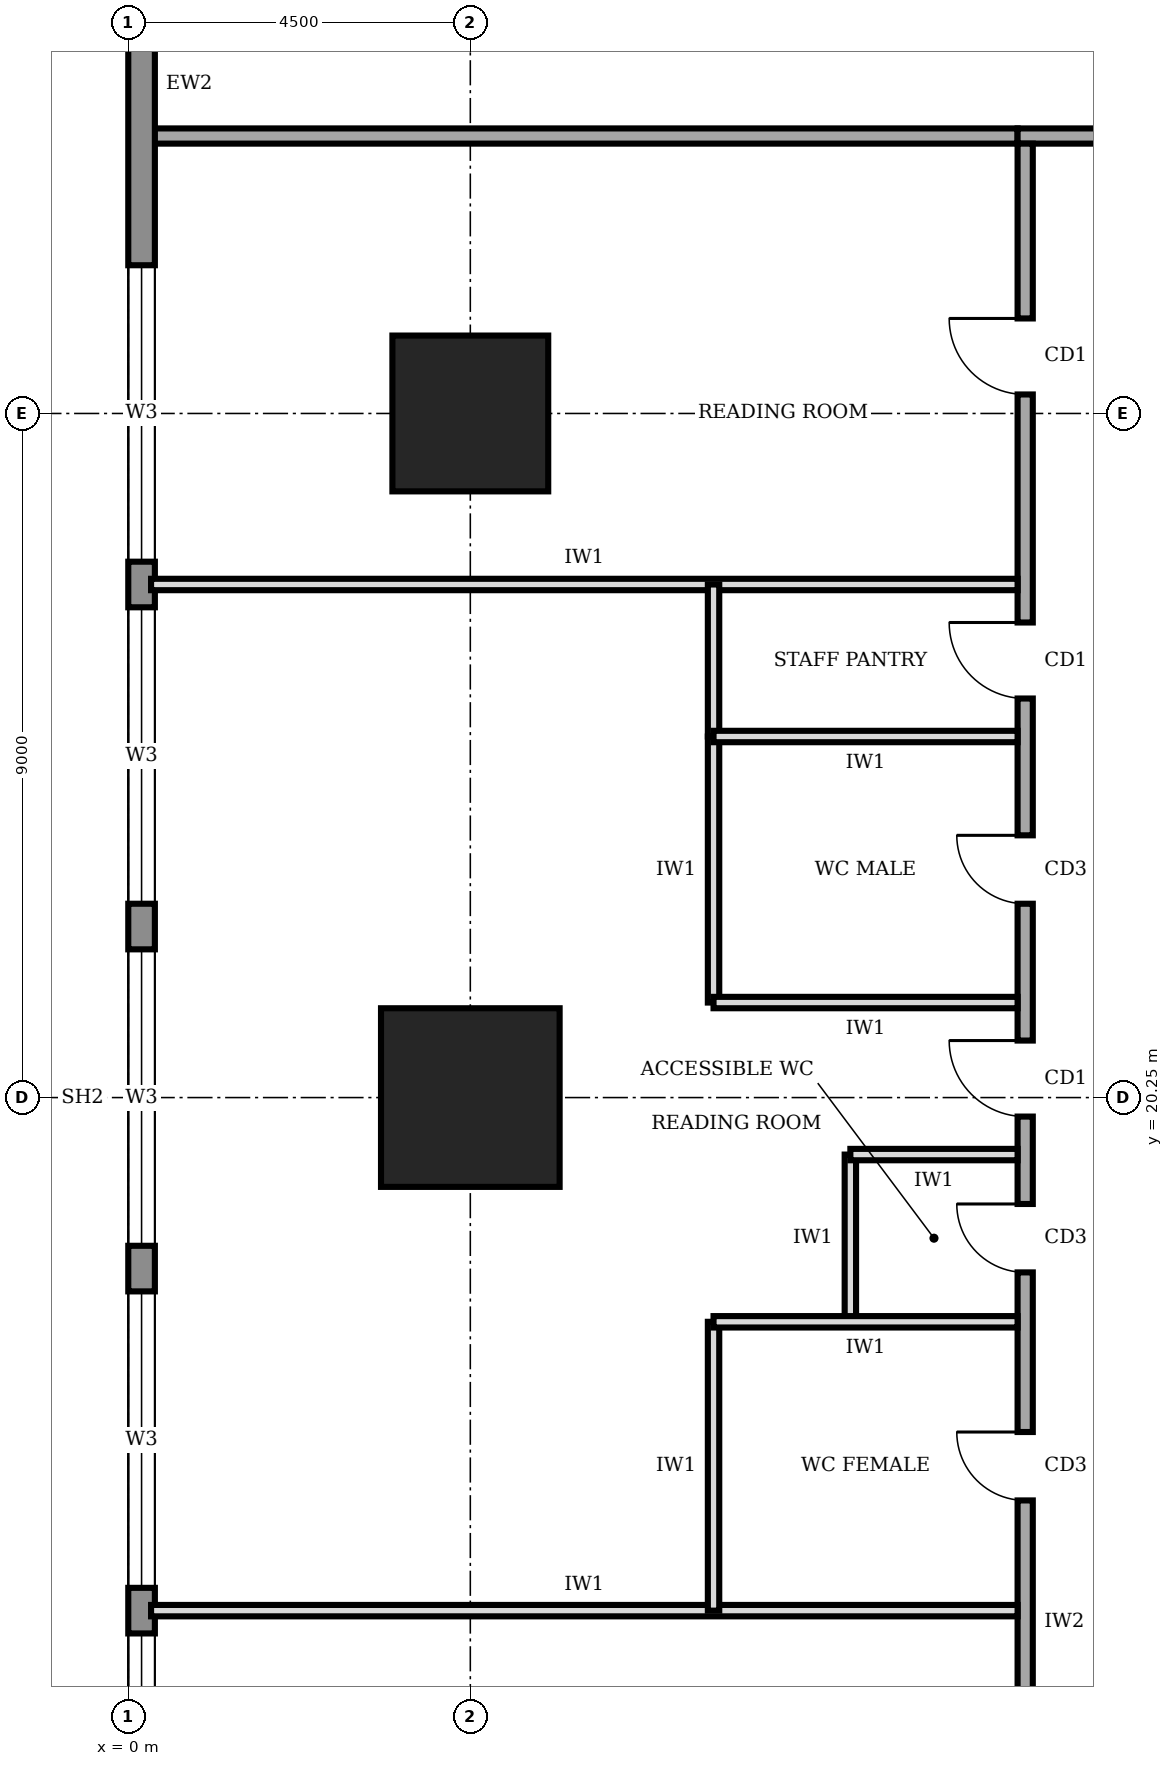
"""IFC4 building model, lengths in metres.
Left out: names, types, materials, properties, quantities, classifications, styles, units other than length and angle.
Written with IfcOpenShell. Run it as: python <this file> out.ifc"""

import sys

from ifc_helpers import new_model, si_unit, direction, frame, frame_2d, origin, origin_2d, place, context, subcontext, project, spatial, rectangle, extrude, element, fill, save


model = new_model("IFC4")
c1 = context("Model", 3, precision=1e-05, world=origin(), true_north=direction((0.0, 1.0)))
c2 = subcontext(c1, "Body", "Model", "MODEL_VIEW")
j1 = project(units=[si_unit("LENGTHUNIT", "METRE"), si_unit("PLANEANGLEUNIT", "RADIAN")], contexts=[c1])
p1 = place(None, origin())
s1 = spatial("IfcSite", under=j1, at=p1, CompositionType="ELEMENT")
p2 = place(p1, origin())
s2 = spatial("IfcBuilding", under=s1, at=p2, CompositionType="ELEMENT")
p3 = place(p2, frame((0.0, 0.0, 201.0)))
s3 = spatial("IfcBuildingStorey", under=s2, at=p3, CompositionType="ELEMENT", Elevation=201.0)
p4 = place(p3, frame((4.5, 20.25, 0.0), z_axis=(0.0, 0.0, 1.0), x_axis=(1.0, 0.0, 0.0)))
e1 = element("IfcColumn", 1, at=p4, inside=s3, PredefinedType="COLUMN", context=c2, shape_type="SweptSolid", body=[
    extrude(rectangle(XDim=2.35, YDim=2.35, at=origin_2d()), origin(), (0.0, 0.0, 1.0), 4.0),
])
p5 = place(p3, frame((4.5, 29.25, 0.0), z_axis=(0.0, 0.0, 1.0), x_axis=(1.0, 0.0, 0.0)))
e2 = element("IfcColumn", 2, at=p5, inside=s3, PredefinedType="COLUMN", context=c2, shape_type="SweptSolid", body=[
    extrude(rectangle(XDim=2.05, YDim=2.05, at=origin_2d()), origin(), (0.0, 0.0, 1.0), 4.0),
])
p6 = place(p3, frame((0.175, 35.98, 0.0), z_axis=(0.0, 0.0, 1.0), x_axis=(0.0, -1.0, 0.0)))
e3 = element("IfcWall", 3, at=p6, inside=s3, PredefinedType="STANDARD", context=c2, shape_type="SweptSolid", body=[
    extrude(rectangle(XDim=31.46, YDim=0.35, at=frame_2d((15.73, 0.0))), origin(), (0.0, 0.0, 1.0), 3.75),
])
p7 = place(p6, frame((27.21, 0.0, 0.95)))
e4 = element("IfcOpeningElement", 4, at=p7, cuts=e3, PredefinedType="OPENING", context=c2, shape_type="SweptSolid", body=[
    extrude(rectangle(XDim=3.9, YDim=1.8, at=frame_2d((1.95, 0.9))), frame((0.0, 0.185, 0.0), z_axis=(0.0, -1.0, 0.0), x_axis=(1.0, 0.0, 0.0)), (0.0, 0.0, 1.0), 0.37),
])
p8 = place(p6, frame((22.78, 0.0, 0.95)))
e5 = element("IfcOpeningElement", 5, at=p8, cuts=e3, PredefinedType="OPENING", context=c2, shape_type="SweptSolid", body=[
    extrude(rectangle(XDim=3.9, YDim=1.8, at=frame_2d((1.95, 0.9))), frame((0.0, 0.185, 0.0), z_axis=(0.0, -1.0, 0.0), x_axis=(1.0, 0.0, 0.0)), (0.0, 0.0, 1.0), 0.37),
])
p9 = place(p6, frame((18.28, 0.0, 0.95)))
e6 = element("IfcOpeningElement", 6, at=p9, cuts=e3, PredefinedType="OPENING", context=c2, shape_type="SweptSolid", body=[
    extrude(rectangle(XDim=3.9, YDim=1.8, at=frame_2d((1.95, 0.9))), frame((0.0, 0.185, 0.0), z_axis=(0.0, -1.0, 0.0), x_axis=(1.0, 0.0, 0.0)), (0.0, 0.0, 1.0), 0.37),
])
p10 = place(p6, frame((13.78, 0.0, 0.95)))
e7 = element("IfcOpeningElement", 7, at=p10, cuts=e3, PredefinedType="OPENING", context=c2, shape_type="SweptSolid", body=[
    extrude(rectangle(XDim=3.9, YDim=1.8, at=frame_2d((1.95, 0.9))), frame((0.0, 0.185, 0.0), z_axis=(0.0, -1.0, 0.0), x_axis=(1.0, 0.0, 0.0)), (0.0, 0.0, 1.0), 0.37),
])
p11 = place(p6, frame((9.28, 0.0, 0.95)))
e8 = element("IfcOpeningElement", 8, at=p11, cuts=e3, PredefinedType="OPENING", context=c2, shape_type="SweptSolid", body=[
    extrude(rectangle(XDim=3.9, YDim=1.8, at=frame_2d((1.95, 0.9))), frame((0.0, 0.185, 0.0), z_axis=(0.0, -1.0, 0.0), x_axis=(1.0, 0.0, 0.0)), (0.0, 0.0, 1.0), 0.37),
])
p12 = place(p6, frame((4.78, 0.0, 0.95)))
e9 = element("IfcOpeningElement", 9, at=p12, cuts=e3, PredefinedType="OPENING", context=c2, shape_type="SweptSolid", body=[
    extrude(rectangle(XDim=3.9, YDim=1.8, at=frame_2d((1.95, 0.9))), frame((0.0, 0.185, 0.0), z_axis=(0.0, -1.0, 0.0), x_axis=(1.0, 0.0, 0.0)), (0.0, 0.0, 1.0), 0.37),
])
p13 = place(p3, frame((28.6, 32.9, 0.0), z_axis=(0.0, 0.0, 1.0), x_axis=(-1.0, 0.0, 0.0)))
e10 = element("IfcWall", 10, at=p13, inside=s3, PredefinedType="SOLIDWALL", context=c2, shape_type="SweptSolid", body=[
    extrude(rectangle(XDim=16.9, YDim=0.2, at=frame_2d((8.45, 0.0))), origin(), (0.0, 0.0, 1.0), 3.75),
])
p14 = place(p13, frame((12.85, 0.0, 0.0)))
e11 = element("IfcOpeningElement", 11, at=p14, cuts=e10, PredefinedType="OPENING", context=c2, shape_type="SweptSolid", body=[
    extrude(rectangle(XDim=1.8, YDim=2.1, at=frame_2d((0.9, 1.05))), frame((0.0, 0.11, 0.0), z_axis=(0.0, -1.0, 0.0), x_axis=(1.0, 0.0, 0.0)), (0.0, 0.0, 1.0), 0.22),
])
p15 = place(p13, frame((5.6, 0.0, 0.0)))
e12 = element("IfcOpeningElement", 12, at=p15, cuts=e10, PredefinedType="OPENING", context=c2, shape_type="SweptSolid", body=[
    extrude(rectangle(XDim=1.0, YDim=2.1, at=frame_2d((0.5, 1.05))), frame((0.0, 0.11, 0.0), z_axis=(0.0, -1.0, 0.0), x_axis=(1.0, 0.0, 0.0)), (0.0, 0.0, 1.0), 0.22),
])
p16 = place(p13, frame((0.275, 0.0, 0.0)))
e13 = element("IfcOpeningElement", 13, at=p16, cuts=e10, PredefinedType="OPENING", context=c2, shape_type="SweptSolid", body=[
    extrude(rectangle(XDim=1.0, YDim=2.1, at=frame_2d((0.5, 1.05))), frame((0.0, 0.11, 0.0), z_axis=(0.0, -1.0, 0.0), x_axis=(1.0, 0.0, 0.0)), (0.0, 0.0, 1.0), 0.22),
])
p17 = place(p3, frame((11.8, 32.8, 0.0), z_axis=(0.0, 0.0, 1.0), x_axis=(0.0, -1.0, 0.0)))
e14 = element("IfcWall", 14, at=p17, inside=s3, PredefinedType="SOLIDWALL", context=c2, shape_type="SweptSolid", body=[
    extrude(rectangle(XDim=23.8, YDim=0.2, at=frame_2d((11.9, 0.0))), origin(), (0.0, 0.0, 1.0), 3.75),
])
p18 = place(p17, frame((21.05, 0.0, 0.0)))
e15 = element("IfcOpeningElement", 15, at=p18, cuts=e14, PredefinedType="OPENING", context=c2, shape_type="SweptSolid", body=[
    extrude(rectangle(XDim=1.0, YDim=2.1, at=frame_2d((0.5, 1.05))), frame((0.0, 0.11, 0.0), z_axis=(0.0, -1.0, 0.0), x_axis=(1.0, 0.0, 0.0)), (0.0, 0.0, 1.0), 0.22),
])
p19 = place(p17, frame((16.95, 0.0, 0.0)))
e16 = element("IfcOpeningElement", 16, at=p19, cuts=e14, PredefinedType="OPENING", context=c2, shape_type="SweptSolid", body=[
    extrude(rectangle(XDim=0.9, YDim=2.1, at=frame_2d((0.45, 1.05))), frame((0.0, 0.11, 0.0), z_axis=(0.0, -1.0, 0.0), x_axis=(1.0, 0.0, 0.0)), (0.0, 0.0, 1.0), 0.22),
])
p20 = place(p17, frame((13.95, 0.0, 0.0)))
e17 = element("IfcOpeningElement", 17, at=p20, cuts=e14, PredefinedType="OPENING", context=c2, shape_type="SweptSolid", body=[
    extrude(rectangle(XDim=0.9, YDim=2.1, at=frame_2d((0.45, 1.05))), frame((0.0, 0.11, 0.0), z_axis=(0.0, -1.0, 0.0), x_axis=(1.0, 0.0, 0.0)), (0.0, 0.0, 1.0), 0.22),
])
p21 = place(p17, frame((9.1, 0.0, 0.0)))
e18 = element("IfcOpeningElement", 18, at=p21, cuts=e14, PredefinedType="OPENING", context=c2, shape_type="SweptSolid", body=[
    extrude(rectangle(XDim=0.9, YDim=2.1, at=frame_2d((0.45, 1.05))), frame((0.0, 0.11, 0.0), z_axis=(0.0, -1.0, 0.0), x_axis=(1.0, 0.0, 0.0)), (0.0, 0.0, 1.0), 0.22),
])
p22 = place(p17, frame((6.3, 0.0, 0.0)))
e19 = element("IfcOpeningElement", 19, at=p22, cuts=e14, PredefinedType="OPENING", context=c2, shape_type="SweptSolid", body=[
    extrude(rectangle(XDim=1.0, YDim=2.1, at=frame_2d((0.5, 1.05))), frame((0.0, 0.11, 0.0), z_axis=(0.0, -1.0, 0.0), x_axis=(1.0, 0.0, 0.0)), (0.0, 0.0, 1.0), 0.22),
])
p23 = place(p17, frame((11.8, 0.0, 0.0)))
e20 = element("IfcOpeningElement", 20, at=p23, cuts=e14, PredefinedType="OPENING", context=c2, shape_type="SweptSolid", body=[
    extrude(rectangle(XDim=1.0, YDim=2.1, at=frame_2d((0.5, 1.05))), frame((0.0, 0.11, 0.0), z_axis=(0.0, -1.0, 0.0), x_axis=(1.0, 0.0, 0.0)), (0.0, 0.0, 1.0), 0.22),
])
p24 = place(p17, frame((2.3, 0.0, 0.0)))
e21 = element("IfcOpeningElement", 21, at=p24, cuts=e14, PredefinedType="OPENING", context=c2, shape_type="SweptSolid", body=[
    extrude(rectangle(XDim=1.0, YDim=2.1, at=frame_2d((0.5, 1.05))), frame((0.0, 0.11, 0.0), z_axis=(0.0, -1.0, 0.0), x_axis=(1.0, 0.0, 0.0)), (0.0, 0.0, 1.0), 0.22),
])
p25 = place(p3, frame((0.3, 32.9, 0.0), z_axis=(0.0, 0.0, 1.0), x_axis=(1.0, 0.0, 0.0)))
e22 = element("IfcWall", 22, at=p25, inside=s3, PredefinedType="SOLIDWALL", context=c2, shape_type="SweptSolid", body=[
    extrude(rectangle(XDim=11.4, YDim=0.2, at=frame_2d((5.7, 0.0))), origin(), (0.0, 0.0, 1.0), 3.75),
])
for number, where, z_axis, x_axis in (
    (23, (0.3, 13.5, 0.0), (0.0, 0.0, 1.0), (1.0, 0.0, 0.0)),
    (24, (0.3, 27.0, 0.0), (0.0, 0.0, 1.0), (1.0, 0.0, 0.0)),
):
    element("IfcWall", number, at=place(p3, frame(where, z_axis=z_axis, x_axis=x_axis)), inside=s3, PredefinedType="PARTITIONING", context=c2, shape_type="SweptSolid", body=[
        extrude(rectangle(XDim=11.4, YDim=0.15, at=frame_2d((5.7, 0.0))), origin(), (0.0, 0.0, 1.0), 3.75),
    ])
p26 = place(p3, frame((11.7, 17.3, 0.0), z_axis=(0.0, 0.0, 1.0), x_axis=(-1.0, 0.0, 0.0)))
e25 = element("IfcWall", 25, at=p26, inside=s3, PredefinedType="PARTITIONING", context=c2, shape_type="SweptSolid", body=[
    extrude(rectangle(XDim=4.0, YDim=0.15, at=frame_2d((2.0, 0.0))), origin(), (0.0, 0.0, 1.0), 3.75),
])
p27 = place(p3, frame((11.7, 19.5, 0.0), z_axis=(0.0, 0.0, 1.0), x_axis=(-1.0, 0.0, 0.0)))
e26 = element("IfcWall", 26, at=p27, inside=s3, PredefinedType="PARTITIONING", context=c2, shape_type="SweptSolid", body=[
    extrude(rectangle(XDim=2.2, YDim=0.15, at=frame_2d((1.1, 0.0))), origin(), (0.0, 0.0, 1.0), 2.85),
])
for number, where, z_axis, x_axis in (
    (27, (11.7, 21.5, 0.0), (0.0, 0.0, 1.0), (-1.0, 0.0, 0.0)),
    (28, (11.7, 25.0, 0.0), (0.0, 0.0, 1.0), (-1.0, 0.0, 0.0)),
):
    element("IfcWall", number, at=place(p3, frame(where, z_axis=z_axis, x_axis=x_axis)), inside=s3, PredefinedType="PARTITIONING", context=c2, shape_type="SweptSolid", body=[
        extrude(rectangle(XDim=4.0, YDim=0.15, at=frame_2d((2.0, 0.0))), origin(), (0.0, 0.0, 1.0), 3.75),
    ])
p28 = place(p3, frame((7.7, 13.5, 0.0), z_axis=(0.0, 0.0, 1.0), x_axis=(0.0, 1.0, 0.0)))
e29 = element("IfcWall", 29, at=p28, inside=s3, PredefinedType="PARTITIONING", context=c2, shape_type="SweptSolid", body=[
    extrude(rectangle(XDim=3.8, YDim=0.15, at=frame_2d((1.9, 0.0))), origin(), (0.0, 0.0, 1.0), 3.75),
])
p29 = place(p3, frame((9.5, 17.3, 0.0), z_axis=(0.0, 0.0, 1.0), x_axis=(0.0, 1.0, 0.0)))
e30 = element("IfcWall", 30, at=p29, inside=s3, PredefinedType="PARTITIONING", context=c2, shape_type="SweptSolid", body=[
    extrude(rectangle(XDim=2.2, YDim=0.15, at=frame_2d((1.1, 0.0))), origin(), (0.0, 0.0, 1.0), 3.75),
])
p30 = place(p3, frame((7.7, 21.5, 0.0), z_axis=(0.0, 0.0, 1.0), x_axis=(0.0, 1.0, 0.0)))
e31 = element("IfcWall", 31, at=p30, inside=s3, PredefinedType="PARTITIONING", context=c2, shape_type="SweptSolid", body=[
    extrude(rectangle(XDim=3.5, YDim=0.15, at=frame_2d((1.75, 0.0))), origin(), (0.0, 0.0, 1.0), 3.75),
])
p31 = place(p3, frame((7.7, 25.0, 0.0), z_axis=(0.0, 0.0, 1.0), x_axis=(0.0, 1.0, 0.0)))
e32 = element("IfcWall", 32, at=p31, inside=s3, PredefinedType="PARTITIONING", context=c2, shape_type="SweptSolid", body=[
    extrude(rectangle(XDim=2.0, YDim=0.15, at=frame_2d((1.0, 0.0))), origin(), (0.0, 0.0, 1.0), 3.75),
])
p32 = place(p8, origin())
e33 = element("IfcWindow", 33, at=p32, inside=s3, PartitioningType="SINGLE_PANEL", PredefinedType="WINDOW", context=c2, shape_type="SweptSolid", body=[
    extrude(rectangle(XDim=3.9, YDim=1.8, at=frame_2d((1.95, 0.9))), frame((0.0, 0.03, 0.0), z_axis=(0.0, -1.0, 0.0), x_axis=(1.0, 0.0, 0.0)), (0.0, 0.0, 1.0), 0.06),
])
fill(e5, e33)
p33 = place(p9, origin())
e34 = element("IfcWindow", 34, at=p33, inside=s3, PartitioningType="SINGLE_PANEL", PredefinedType="WINDOW", context=c2, shape_type="SweptSolid", body=[
    extrude(rectangle(XDim=3.9, YDim=1.8, at=frame_2d((1.95, 0.9))), frame((0.0, 0.03, 0.0), z_axis=(0.0, -1.0, 0.0), x_axis=(1.0, 0.0, 0.0)), (0.0, 0.0, 1.0), 0.06),
])
fill(e6, e34)
p34 = place(p10, origin())
e35 = element("IfcWindow", 35, at=p34, inside=s3, PartitioningType="SINGLE_PANEL", PredefinedType="WINDOW", context=c2, shape_type="SweptSolid", body=[
    extrude(rectangle(XDim=3.9, YDim=1.8, at=frame_2d((1.95, 0.9))), frame((0.0, 0.03, 0.0), z_axis=(0.0, -1.0, 0.0), x_axis=(1.0, 0.0, 0.0)), (0.0, 0.0, 1.0), 0.06),
])
fill(e7, e35)
p35 = place(p11, origin())
e36 = element("IfcWindow", 36, at=p35, inside=s3, PartitioningType="SINGLE_PANEL", PredefinedType="WINDOW", context=c2, shape_type="SweptSolid", body=[
    extrude(rectangle(XDim=3.9, YDim=1.8, at=frame_2d((1.95, 0.9))), frame((0.0, 0.03, 0.0), z_axis=(0.0, -1.0, 0.0), x_axis=(1.0, 0.0, 0.0)), (0.0, 0.0, 1.0), 0.06),
])
fill(e8, e36)
p36 = place(p12, origin())
e37 = element("IfcWindow", 37, at=p36, inside=s3, PartitioningType="SINGLE_PANEL", PredefinedType="WINDOW", context=c2, shape_type="SweptSolid", body=[
    extrude(rectangle(XDim=3.9, YDim=1.8, at=frame_2d((1.95, 0.9))), frame((0.0, 0.03, 0.0), z_axis=(0.0, -1.0, 0.0), x_axis=(1.0, 0.0, 0.0)), (0.0, 0.0, 1.0), 0.06),
])
fill(e9, e37)
p37 = place(p19, frame((0.9, 0.0, 0.0), z_axis=(0.0, 0.0, 1.0), x_axis=(-1.0, 0.0, 0.0)))
e38 = element("IfcDoor", 38, at=p37, inside=s3, OperationType="SINGLE_SWING_RIGHT", PredefinedType="DOOR", context=c2, shape_type="SweptSolid", body=[
    extrude(rectangle(XDim=0.9, YDim=2.1, at=frame_2d((0.45, 1.05))), frame((0.0, 0.025, 0.0), z_axis=(0.0, -1.0, 0.0), x_axis=(1.0, 0.0, 0.0)), (0.0, 0.0, 1.0), 0.05),
])
fill(e16, e38)
p38 = place(p20, frame((0.9, 0.0, 0.0), z_axis=(0.0, 0.0, 1.0), x_axis=(-1.0, 0.0, 0.0)))
e39 = element("IfcDoor", 39, at=p38, inside=s3, OperationType="SINGLE_SWING_RIGHT", PredefinedType="DOOR", context=c2, shape_type="SweptSolid", body=[
    extrude(rectangle(XDim=0.9, YDim=2.1, at=frame_2d((0.45, 1.05))), frame((0.0, 0.025, 0.0), z_axis=(0.0, -1.0, 0.0), x_axis=(1.0, 0.0, 0.0)), (0.0, 0.0, 1.0), 0.05),
])
fill(e17, e39)
p39 = place(p21, frame((0.9, 0.0, 0.0), z_axis=(0.0, 0.0, 1.0), x_axis=(-1.0, 0.0, 0.0)))
e40 = element("IfcDoor", 40, at=p39, inside=s3, OperationType="SINGLE_SWING_RIGHT", PredefinedType="DOOR", context=c2, shape_type="SweptSolid", body=[
    extrude(rectangle(XDim=0.9, YDim=2.1, at=frame_2d((0.45, 1.05))), frame((0.0, 0.025, 0.0), z_axis=(0.0, -1.0, 0.0), x_axis=(1.0, 0.0, 0.0)), (0.0, 0.0, 1.0), 0.05),
])
fill(e18, e40)
p40 = place(p22, frame((1.0, 0.0, 0.0), z_axis=(0.0, 0.0, 1.0), x_axis=(-1.0, 0.0, 0.0)))
e41 = element("IfcDoor", 41, at=p40, inside=s3, OperationType="SINGLE_SWING_RIGHT", PredefinedType="DOOR", context=c2, shape_type="SweptSolid", body=[
    extrude(rectangle(XDim=1.0, YDim=2.1, at=frame_2d((0.5, 1.05))), frame((0.0, 0.025, 0.0), z_axis=(0.0, -1.0, 0.0), x_axis=(1.0, 0.0, 0.0)), (0.0, 0.0, 1.0), 0.05),
])
fill(e19, e41)
p41 = place(p23, frame((1.0, 0.0, 0.0), z_axis=(0.0, 0.0, 1.0), x_axis=(-1.0, 0.0, 0.0)))
e42 = element("IfcDoor", 42, at=p41, inside=s3, OperationType="SINGLE_SWING_RIGHT", PredefinedType="DOOR", context=c2, shape_type="SweptSolid", body=[
    extrude(rectangle(XDim=1.0, YDim=2.1, at=frame_2d((0.5, 1.05))), frame((0.0, 0.025, 0.0), z_axis=(0.0, -1.0, 0.0), x_axis=(1.0, 0.0, 0.0)), (0.0, 0.0, 1.0), 0.05),
])
fill(e20, e42)
p42 = place(p24, frame((1.0, 0.0, 0.0), z_axis=(0.0, 0.0, 1.0), x_axis=(-1.0, 0.0, 0.0)))
e43 = element("IfcDoor", 43, at=p42, inside=s3, OperationType="SINGLE_SWING_RIGHT", PredefinedType="DOOR", context=c2, shape_type="SweptSolid", body=[
    extrude(rectangle(XDim=1.0, YDim=2.1, at=frame_2d((0.5, 1.05))), frame((0.0, 0.025, 0.0), z_axis=(0.0, -1.0, 0.0), x_axis=(1.0, 0.0, 0.0)), (0.0, 0.0, 1.0), 0.05),
])
fill(e21, e43)
save(model, sys.argv[1])
